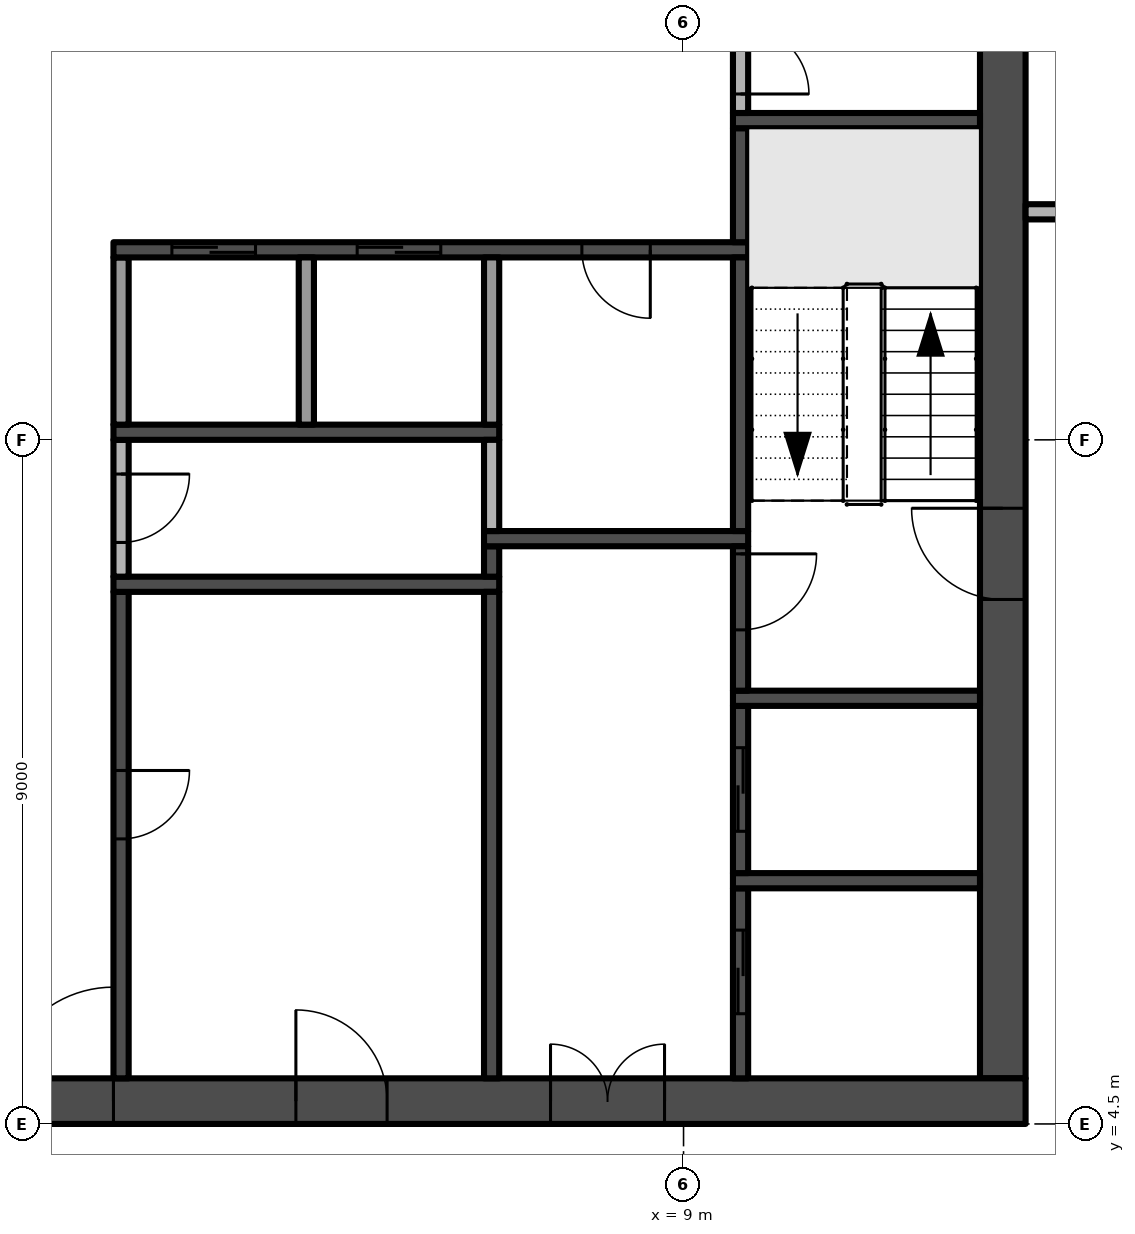
"""IFC4 building model, lengths in metres.
Left out: names, types, materials, properties, quantities, classifications, styles, units other than length and angle.
Written with IfcOpenShell. Run it as: python <this file> out.ifc"""

import sys

from ifc_helpers import new_model, si_unit, direction, frame, frame_2d, origin, place, context, subcontext, project, spatial, rectangle, extrude, element, fill, save


model = new_model("IFC4")
c1 = context("Model", 3, precision=1e-05, world=origin(), true_north=direction((0.0, 1.0)))
c2 = subcontext(c1, "Body", "Model", "MODEL_VIEW")
j1 = project(units=[si_unit("LENGTHUNIT", "METRE"), si_unit("PLANEANGLEUNIT", "RADIAN")], contexts=[c1])
p1 = place(None, origin())
s1 = spatial("IfcSite", under=j1, at=p1, CompositionType="ELEMENT")
p2 = place(p1, origin())
s2 = spatial("IfcBuilding", under=s1, at=p2, CompositionType="ELEMENT")
p3 = place(p2, frame((0.0, 0.0, 199.6)))
s3 = spatial("IfcBuildingStorey", under=s2, at=p3, CompositionType="ELEMENT", Elevation=199.6)
p4 = place(p3, frame((-13.5, 4.8, -0.3), z_axis=(0.0, 0.0, 1.0), x_axis=(1.0, 0.0, 0.0)))
e1 = element("IfcWall", 1, at=p4, inside=s3, PredefinedType="SHEAR", context=c2, shape_type="SweptSolid", body=[
    extrude(rectangle(XDim=27.0, YDim=0.6, at=frame_2d((13.5, 0.0))), origin(), (0.0, 0.0, 1.0), 3.8),
])
p5 = place(p4, frame((12.0, 0.0, 0.3)))
e2 = element("IfcOpeningElement", 2, at=p5, cuts=e1, PredefinedType="OPENING", context=c2, shape_type="SweptSolid", body=[
    extrude(rectangle(XDim=3.0, YDim=2.4, at=frame_2d((1.5, 1.2))), frame((0.0, 0.31, 0.0), z_axis=(0.0, -1.0, 0.0), x_axis=(1.0, 0.0, 0.0)), (0.0, 0.0, 1.0), 0.62),
])
p6 = place(p4, frame((4.9, 0.0, 0.3)))
e3 = element("IfcOpeningElement", 3, at=p6, cuts=e1, PredefinedType="OPENING", context=c2, shape_type="SweptSolid", body=[
    extrude(rectangle(XDim=1.2, YDim=2.2, at=frame_2d((0.6, 1.1))), frame((0.0, 0.31, 0.0), z_axis=(0.0, -1.0, 0.0), x_axis=(1.0, 0.0, 0.0)), (0.0, 0.0, 1.0), 0.62),
])
p7 = place(p4, frame((20.75, 0.0, 0.3)))
e4 = element("IfcOpeningElement", 4, at=p7, cuts=e1, PredefinedType="OPENING", context=c2, shape_type="SweptSolid", body=[
    extrude(rectangle(XDim=1.5, YDim=2.2, at=frame_2d((0.75, 1.1))), frame((0.0, 0.31, 0.0), z_axis=(0.0, -1.0, 0.0), x_axis=(1.0, 0.0, 0.0)), (0.0, 0.0, 1.0), 0.62),
])
p8 = place(p4, frame((17.4, 0.0, 0.3)))
e5 = element("IfcOpeningElement", 5, at=p8, cuts=e1, PredefinedType="OPENING", context=c2, shape_type="SweptSolid", body=[
    extrude(rectangle(XDim=1.2, YDim=2.2, at=frame_2d((0.6, 1.1))), frame((0.0, 0.31, 0.0), z_axis=(0.0, -1.0, 0.0), x_axis=(1.0, 0.0, 0.0)), (0.0, 0.0, 1.0), 0.62),
])
p9 = place(p3, frame((13.2, 5.1, -0.3), z_axis=(0.0, 0.0, 1.0), x_axis=(0.0, 1.0, 0.0)))
e6 = element("IfcWall", 6, at=p9, inside=s3, PredefinedType="SHEAR", context=c2, shape_type="SweptSolid", body=[
    extrude(rectangle(XDim=16.8, YDim=0.6, at=frame_2d((8.4, 0.0))), origin(), (0.0, 0.0, 1.0), 3.8),
])
p10 = place(p9, frame((6.3, 0.0, 0.3)))
e7 = element("IfcOpeningElement", 7, at=p10, cuts=e6, PredefinedType="OPENING", context=c2, shape_type="SweptSolid", body=[
    extrude(rectangle(XDim=1.2, YDim=2.2, at=frame_2d((0.6, 1.1))), frame((0.0, 0.31, 0.0), z_axis=(0.0, -1.0, 0.0), x_axis=(1.0, 0.0, 0.0)), (0.0, 0.0, 1.0), 0.62),
])
p11 = place(p3, frame((1.6, 11.5, 0.0), z_axis=(0.0, 0.0, 1.0), x_axis=(0.0, -1.0, 0.0)))
e8 = element("IfcWall", 8, at=p11, inside=s3, PredefinedType="SHEAR", context=c2, shape_type="SweptSolid", body=[
    extrude(rectangle(XDim=6.4, YDim=0.2, at=frame_2d((3.2, 0.0))), origin(), (0.0, 0.0, 1.0), 3.5),
])
p12 = place(p11, frame((2.35, 0.0, 0.0)))
e9 = element("IfcOpeningElement", 9, at=p12, cuts=e8, PredefinedType="OPENING", context=c2, shape_type="SweptSolid", body=[
    extrude(rectangle(XDim=0.9, YDim=2.1, at=frame_2d((0.45, 1.05))), frame((0.0, 0.11, 0.0), z_axis=(0.0, -1.0, 0.0), x_axis=(1.0, 0.0, 0.0)), (0.0, 0.0, 1.0), 0.22),
])
p13 = place(p3, frame((1.5, 11.6, 0.0), z_axis=(0.0, 0.0, 1.0), x_axis=(1.0, 0.0, 0.0)))
e10 = element("IfcWall", 10, at=p13, inside=s3, PredefinedType="SHEAR", context=c2, shape_type="SweptSolid", body=[
    extrude(rectangle(XDim=5.075, YDim=0.2, at=frame_2d((2.538, 0.0))), origin(), (0.0, 0.0, 1.0), 3.5),
])
p14 = place(p3, frame((1.6, 13.5, 0.0), z_axis=(0.0, 0.0, 1.0), x_axis=(0.0, -1.0, 0.0)))
e11 = element("IfcWall", 11, at=p14, inside=s3, PredefinedType="PARTITIONING", context=c2, shape_type="SweptSolid", body=[
    extrude(rectangle(XDim=1.8, YDim=0.2, at=frame_2d((0.9, 0.0))), origin(), (0.0, 0.0, 1.0), 3.5),
])
p15 = place(p14, frame((0.45, 0.0, 0.0)))
e12 = element("IfcOpeningElement", 12, at=p15, cuts=e11, PredefinedType="OPENING", context=c2, shape_type="SweptSolid", body=[
    extrude(rectangle(XDim=0.9, YDim=2.1, at=frame_2d((0.45, 1.05))), frame((0.0, 0.11, 0.0), z_axis=(0.0, -1.0, 0.0), x_axis=(1.0, 0.0, 0.0)), (0.0, 0.0, 1.0), 0.22),
])
p16 = place(p3, frame((1.5, 13.6, 0.0), z_axis=(0.0, 0.0, 1.0), x_axis=(1.0, 0.0, 0.0)))
e13 = element("IfcWall", 13, at=p16, inside=s3, PredefinedType="SHEAR", context=c2, shape_type="SweptSolid", body=[
    extrude(rectangle(XDim=5.075, YDim=0.2, at=frame_2d((2.538, 0.0))), origin(), (0.0, 0.0, 1.0), 3.5),
])
p17 = place(p3, frame((1.6, 13.7, 0.0), z_axis=(0.0, 0.0, 1.0), x_axis=(0.0, 1.0, 0.0)))
e14 = element("IfcWall", 14, at=p17, inside=s3, PredefinedType="PARTITIONING", context=c2, shape_type="SweptSolid", body=[
    extrude(rectangle(XDim=2.2, YDim=0.2, at=frame_2d((1.1, 0.0))), origin(), (0.0, 0.0, 1.0), 3.5),
])
p18 = place(p3, frame((9.85, 16.0, 0.0), z_axis=(0.0, 0.0, 1.0), x_axis=(-1.0, 0.0, 0.0)))
e15 = element("IfcWall", 15, at=p18, inside=s3, PredefinedType="SHEAR", context=c2, shape_type="SweptSolid", body=[
    extrude(rectangle(XDim=8.35, YDim=0.2, at=frame_2d((4.175, 0.0))), origin(), (0.0, 0.0, 1.0), 3.5),
])
p19 = place(p18, frame((6.481, 0.0, 0.0)))
e16 = element("IfcOpeningElement", 16, at=p19, cuts=e15, PredefinedType="OPENING", context=c2, shape_type="SweptSolid", body=[
    extrude(rectangle(XDim=1.1, YDim=2.1, at=frame_2d((0.55, 1.05))), frame((0.0, 0.11, 0.0), z_axis=(0.0, -1.0, 0.0), x_axis=(1.0, 0.0, 0.0)), (0.0, 0.0, 1.0), 0.22),
])
p20 = place(p18, frame((4.044, 0.0, 0.0)))
e17 = element("IfcOpeningElement", 17, at=p20, cuts=e15, PredefinedType="OPENING", context=c2, shape_type="SweptSolid", body=[
    extrude(rectangle(XDim=1.1, YDim=2.1, at=frame_2d((0.55, 1.05))), frame((0.0, 0.11, 0.0), z_axis=(0.0, -1.0, 0.0), x_axis=(1.0, 0.0, 0.0)), (0.0, 0.0, 1.0), 0.22),
])
p21 = place(p18, frame((1.288, 0.0, 0.0)))
e18 = element("IfcOpeningElement", 18, at=p21, cuts=e15, PredefinedType="OPENING", context=c2, shape_type="SweptSolid", body=[
    extrude(rectangle(XDim=0.9, YDim=2.1, at=frame_2d((0.45, 1.05))), frame((0.0, 0.11, 0.0), z_axis=(0.0, -1.0, 0.0), x_axis=(1.0, 0.0, 0.0)), (0.0, 0.0, 1.0), 0.22),
])
p22 = place(p3, frame((4.037, 13.7, 0.0), z_axis=(0.0, 0.0, 1.0), x_axis=(0.0, 1.0, 0.0)))
e19 = element("IfcWall", 19, at=p22, inside=s3, PredefinedType="PARTITIONING", context=c2, shape_type="SweptSolid", body=[
    extrude(rectangle(XDim=2.2, YDim=0.2, at=frame_2d((1.1, 0.0))), origin(), (0.0, 0.0, 1.0), 3.5),
])
p23 = place(p3, frame((6.475, 5.1, 0.0), z_axis=(0.0, 0.0, 1.0), x_axis=(0.0, 1.0, 0.0)))
e20 = element("IfcWall", 20, at=p23, inside=s3, PredefinedType="SHEAR", context=c2, shape_type="SweptSolid", body=[
    extrude(rectangle(XDim=6.4, YDim=0.2, at=frame_2d((3.2, 0.0))), origin(), (0.0, 0.0, 1.0), 3.5),
])
p24 = place(p3, frame((6.475, 11.7, 0.0), z_axis=(0.0, 0.0, 1.0), x_axis=(0.0, 1.0, 0.0)))
e21 = element("IfcWall", 21, at=p24, inside=s3, PredefinedType="SHEAR", context=c2, shape_type="SweptSolid", body=[
    extrude(rectangle(XDim=0.4, YDim=0.2, at=frame_2d((0.2, 0.0))), origin(), (0.0, 0.0, 1.0), 3.5),
])
p25 = place(p3, frame((6.375, 12.2, 0.0), z_axis=(0.0, 0.0, 1.0), x_axis=(1.0, 0.0, 0.0)))
e22 = element("IfcWall", 22, at=p25, inside=s3, PredefinedType="SHEAR", context=c2, shape_type="SweptSolid", body=[
    extrude(rectangle(XDim=3.475, YDim=0.2, at=frame_2d((1.738, 0.0))), origin(), (0.0, 0.0, 1.0), 3.5),
])
p26 = place(p3, frame((6.475, 12.3, 0.0), z_axis=(0.0, 0.0, 1.0), x_axis=(0.0, 1.0, 0.0)))
e23 = element("IfcWall", 23, at=p26, inside=s3, PredefinedType="PARTITIONING", context=c2, shape_type="SweptSolid", body=[
    extrude(rectangle(XDim=1.2, YDim=0.2, at=frame_2d((0.6, 0.0))), origin(), (0.0, 0.0, 1.0), 3.5),
])
p27 = place(p3, frame((6.475, 13.7, 0.0), z_axis=(0.0, 0.0, 1.0), x_axis=(0.0, 1.0, 0.0)))
e24 = element("IfcWall", 24, at=p27, inside=s3, PredefinedType="PARTITIONING", context=c2, shape_type="SweptSolid", body=[
    extrude(rectangle(XDim=2.2, YDim=0.2, at=frame_2d((1.1, 0.0))), origin(), (0.0, 0.0, 1.0), 3.5),
])
p28 = place(p3, frame((9.75, 5.1, 0.0), z_axis=(0.0, 0.0, 1.0), x_axis=(0.0, 1.0, 0.0)))
e25 = element("IfcWall", 25, at=p28, inside=s3, PredefinedType="SHEAR", context=c2, shape_type="SweptSolid", body=[
    extrude(rectangle(XDim=2.5, YDim=0.2, at=frame_2d((1.25, 0.0))), origin(), (0.0, 0.0, 1.0), 3.5),
])
p29 = place(p28, frame((0.85, 0.0, 0.0)))
e26 = element("IfcOpeningElement", 26, at=p29, cuts=e25, PredefinedType="OPENING", context=c2, shape_type="SweptSolid", body=[
    extrude(rectangle(XDim=1.1, YDim=2.1, at=frame_2d((0.55, 1.05))), frame((0.0, 0.11, 0.0), z_axis=(0.0, -1.0, 0.0), x_axis=(1.0, 0.0, 0.0)), (0.0, 0.0, 1.0), 0.22),
])
p30 = place(p3, frame((9.65, 7.7, 0.0), z_axis=(0.0, 0.0, 1.0), x_axis=(1.0, 0.0, 0.0)))
e27 = element("IfcWall", 27, at=p30, inside=s3, PredefinedType="SHEAR", context=c2, shape_type="SweptSolid", body=[
    extrude(rectangle(XDim=3.25, YDim=0.2, at=frame_2d((1.625, 0.0))), origin(), (0.0, 0.0, 1.0), 3.5),
])
p31 = place(p3, frame((9.75, 7.8, 0.0), z_axis=(0.0, 0.0, 1.0), x_axis=(0.0, 1.0, 0.0)))
e28 = element("IfcWall", 28, at=p31, inside=s3, PredefinedType="SHEAR", context=c2, shape_type="SweptSolid", body=[
    extrude(rectangle(XDim=2.2, YDim=0.2, at=frame_2d((1.1, 0.0))), origin(), (0.0, 0.0, 1.0), 3.5),
])
p32 = place(p31, frame((0.55, 0.0, 0.0)))
e29 = element("IfcOpeningElement", 29, at=p32, cuts=e28, PredefinedType="OPENING", context=c2, shape_type="SweptSolid", body=[
    extrude(rectangle(XDim=1.1, YDim=2.1, at=frame_2d((0.55, 1.05))), frame((0.0, 0.11, 0.0), z_axis=(0.0, -1.0, 0.0), x_axis=(1.0, 0.0, 0.0)), (0.0, 0.0, 1.0), 0.22),
])
p33 = place(p3, frame((9.65, 10.1, 0.0), z_axis=(0.0, 0.0, 1.0), x_axis=(1.0, 0.0, 0.0)))
e30 = element("IfcWall", 30, at=p33, inside=s3, PredefinedType="SHEAR", context=c2, shape_type="SweptSolid", body=[
    extrude(rectangle(XDim=3.25, YDim=0.2, at=frame_2d((1.625, 0.0))), origin(), (0.0, 0.0, 1.0), 3.5),
])
p34 = place(p3, frame((9.75, 12.1, 0.0), z_axis=(0.0, 0.0, 1.0), x_axis=(0.0, -1.0, 0.0)))
e31 = element("IfcWall", 31, at=p34, inside=s3, PredefinedType="SHEAR", context=c2, shape_type="SweptSolid", body=[
    extrude(rectangle(XDim=1.9, YDim=0.2, at=frame_2d((0.95, 0.0))), origin(), (0.0, 0.0, 1.0), 3.5),
])
p35 = place(p34, frame((0.1, 0.0, 0.0)))
e32 = element("IfcOpeningElement", 32, at=p35, cuts=e31, PredefinedType="OPENING", context=c2, shape_type="SweptSolid", body=[
    extrude(rectangle(XDim=1.0, YDim=2.2, at=frame_2d((0.5, 1.1))), frame((0.0, 0.11, 0.0), z_axis=(0.0, -1.0, 0.0), x_axis=(1.0, 0.0, 0.0)), (0.0, 0.0, 1.0), 0.22),
])
p36 = place(p3, frame((9.75, 12.3, 0.0), z_axis=(0.0, 0.0, 1.0), x_axis=(0.0, 1.0, 0.0)))
e33 = element("IfcWall", 33, at=p36, inside=s3, PredefinedType="SHEAR", context=c2, shape_type="SweptSolid", body=[
    extrude(rectangle(XDim=3.6, YDim=0.2, at=frame_2d((1.8, 0.0))), origin(), (0.0, 0.0, 1.0), 3.5),
])
p37 = place(p3, frame((9.75, 16.1, 0.0), z_axis=(0.0, 0.0, 1.0), x_axis=(0.0, 1.0, 0.0)))
e34 = element("IfcWall", 34, at=p37, inside=s3, PredefinedType="SHEAR", context=c2, shape_type="SweptSolid", body=[
    extrude(rectangle(XDim=1.5, YDim=0.2, at=frame_2d((0.75, 0.0))), origin(), (0.0, 0.0, 1.0), 3.5),
])
p38 = place(p3, frame((9.65, 17.7, 0.0), z_axis=(0.0, 0.0, 1.0), x_axis=(1.0, 0.0, 0.0)))
e35 = element("IfcWall", 35, at=p38, inside=s3, PredefinedType="SHEAR", context=c2, shape_type="SweptSolid", body=[
    extrude(rectangle(XDim=3.25, YDim=0.2, at=frame_2d((1.625, 0.0))), origin(), (0.0, 0.0, 1.0), 3.5),
])
p39 = place(p3, frame((9.75, 19.2, 0.0), z_axis=(0.0, 0.0, 1.0), x_axis=(0.0, -1.0, 0.0)))
e36 = element("IfcWall", 36, at=p39, inside=s3, PredefinedType="PARTITIONING", context=c2, shape_type="SweptSolid", body=[
    extrude(rectangle(XDim=1.4, YDim=0.2, at=frame_2d((0.7, 0.0))), origin(), (0.0, 0.0, 1.0), 3.5),
])
p40 = place(p39, frame((0.25, 0.0, 0.0)))
e37 = element("IfcOpeningElement", 37, at=p40, cuts=e36, PredefinedType="OPENING", context=c2, shape_type="SweptSolid", body=[
    extrude(rectangle(XDim=0.9, YDim=2.1, at=frame_2d((0.45, 1.05))), frame((0.0, 0.11, 0.0), z_axis=(0.0, -1.0, 0.0), x_axis=(1.0, 0.0, 0.0)), (0.0, 0.0, 1.0), 0.22),
])
p41 = place(p3, frame((13.5, 16.5, 0.0), z_axis=(0.0, 0.0, 1.0), x_axis=(1.0, 0.0, 0.0)))
e38 = element("IfcWall", 38, at=p41, inside=s3, PredefinedType="PARTITIONING", context=c2, shape_type="SweptSolid", body=[
    extrude(rectangle(XDim=3.825, YDim=0.2, at=frame_2d((1.913, 0.0))), origin(), (0.0, 0.0, 1.0), 3.5),
])
p42 = place(p41, frame((1.55, 0.0, 0.0)))
e39 = element("IfcOpeningElement", 39, at=p42, cuts=e38, PredefinedType="OPENING", context=c2, shape_type="SweptSolid", body=[
    extrude(rectangle(XDim=0.9, YDim=2.1, at=frame_2d((0.45, 1.05))), frame((0.0, 0.11, 0.0), z_axis=(0.0, -1.0, 0.0), x_axis=(1.0, 0.0, 0.0)), (0.0, 0.0, 1.0), 0.22),
])
p43 = place(p5, frame((3.0, 0.0, 0.0), z_axis=(0.0, 0.0, 1.0), x_axis=(-1.0, 0.0, 0.0)))
e40 = element("IfcDoor", 40, at=p43, inside=s3, OperationType="DOUBLE_DOOR_SINGLE_SWING", PredefinedType="DOOR", context=c2, shape_type="SweptSolid", body=[
    extrude(rectangle(XDim=3.0, YDim=2.4, at=frame_2d((1.5, 1.2))), frame((0.0, 0.025, 0.0), z_axis=(0.0, -1.0, 0.0), x_axis=(1.0, 0.0, 0.0)), (0.0, 0.0, 1.0), 0.05),
])
fill(e2, e40)
p44 = place(p10, frame((1.2, 0.0, 0.0), z_axis=(0.0, 0.0, 1.0), x_axis=(-1.0, 0.0, 0.0)))
e41 = element("IfcDoor", 41, at=p44, inside=s3, OperationType="SINGLE_SWING_LEFT", PredefinedType="DOOR", context=c2, shape_type="SweptSolid", body=[
    extrude(rectangle(XDim=1.2, YDim=2.2, at=frame_2d((0.6, 1.1))), frame((0.0, 0.025, 0.0), z_axis=(0.0, -1.0, 0.0), x_axis=(1.0, 0.0, 0.0)), (0.0, 0.0, 1.0), 0.05),
])
fill(e7, e41)
p45 = place(p7, frame((1.5, 0.0, 0.0), z_axis=(0.0, 0.0, 1.0), x_axis=(-1.0, 0.0, 0.0)))
e42 = element("IfcDoor", 42, at=p45, inside=s3, OperationType="DOUBLE_DOOR_SINGLE_SWING", PredefinedType="DOOR", context=c2, shape_type="SweptSolid", body=[
    extrude(rectangle(XDim=1.5, YDim=2.2, at=frame_2d((0.75, 1.1))), frame((0.0, 0.025, 0.0), z_axis=(0.0, -1.0, 0.0), x_axis=(1.0, 0.0, 0.0)), (0.0, 0.0, 1.0), 0.05),
])
fill(e4, e42)
p46 = place(p8, frame((1.2, 0.0, 0.0), z_axis=(0.0, 0.0, 1.0), x_axis=(-1.0, 0.0, 0.0)))
e43 = element("IfcDoor", 43, at=p46, inside=s3, OperationType="SINGLE_SWING_RIGHT", PredefinedType="DOOR", context=c2, shape_type="SweptSolid", body=[
    extrude(rectangle(XDim=1.2, YDim=2.2, at=frame_2d((0.6, 1.1))), frame((0.0, 0.025, 0.0), z_axis=(0.0, -1.0, 0.0), x_axis=(1.0, 0.0, 0.0)), (0.0, 0.0, 1.0), 0.05),
])
fill(e5, e43)
p47 = place(p35, origin())
e44 = element("IfcDoor", 44, at=p47, inside=s3, OperationType="SINGLE_SWING_LEFT", PredefinedType="DOOR", context=c2, shape_type="SweptSolid", body=[
    extrude(rectangle(XDim=1.0, YDim=2.2, at=frame_2d((0.5, 1.1))), frame((0.0, 0.025, 0.0), z_axis=(0.0, -1.0, 0.0), x_axis=(1.0, 0.0, 0.0)), (0.0, 0.0, 1.0), 0.05),
])
fill(e32, e44)
p48 = place(p19, origin())
e45 = element("IfcDoor", 45, at=p48, inside=s3, OperationType="SLIDING_TO_RIGHT", PredefinedType="DOOR", context=c2, shape_type="SweptSolid", body=[
    extrude(rectangle(XDim=1.1, YDim=2.1, at=frame_2d((0.55, 1.05))), frame((0.0, 0.025, 0.0), z_axis=(0.0, -1.0, 0.0), x_axis=(1.0, 0.0, 0.0)), (0.0, 0.0, 1.0), 0.05),
])
fill(e16, e45)
p49 = place(p20, origin())
e46 = element("IfcDoor", 46, at=p49, inside=s3, OperationType="SLIDING_TO_RIGHT", PredefinedType="DOOR", context=c2, shape_type="SweptSolid", body=[
    extrude(rectangle(XDim=1.1, YDim=2.1, at=frame_2d((0.55, 1.05))), frame((0.0, 0.025, 0.0), z_axis=(0.0, -1.0, 0.0), x_axis=(1.0, 0.0, 0.0)), (0.0, 0.0, 1.0), 0.05),
])
fill(e17, e46)
p50 = place(p29, origin())
e47 = element("IfcDoor", 47, at=p50, inside=s3, OperationType="SLIDING_TO_RIGHT", PredefinedType="DOOR", context=c2, shape_type="SweptSolid", body=[
    extrude(rectangle(XDim=1.1, YDim=2.1, at=frame_2d((0.55, 1.05))), frame((0.0, 0.025, 0.0), z_axis=(0.0, -1.0, 0.0), x_axis=(1.0, 0.0, 0.0)), (0.0, 0.0, 1.0), 0.05),
])
fill(e26, e47)
p51 = place(p32, origin())
e48 = element("IfcDoor", 48, at=p51, inside=s3, OperationType="SLIDING_TO_RIGHT", PredefinedType="DOOR", context=c2, shape_type="SweptSolid", body=[
    extrude(rectangle(XDim=1.1, YDim=2.1, at=frame_2d((0.55, 1.05))), frame((0.0, 0.025, 0.0), z_axis=(0.0, -1.0, 0.0), x_axis=(1.0, 0.0, 0.0)), (0.0, 0.0, 1.0), 0.05),
])
fill(e29, e48)
p52 = place(p12, origin())
e49 = element("IfcDoor", 49, at=p52, inside=s3, OperationType="SINGLE_SWING_LEFT", PredefinedType="DOOR", context=c2, shape_type="SweptSolid", body=[
    extrude(rectangle(XDim=0.9, YDim=2.1, at=frame_2d((0.45, 1.05))), frame((0.0, 0.025, 0.0), z_axis=(0.0, -1.0, 0.0), x_axis=(1.0, 0.0, 0.0)), (0.0, 0.0, 1.0), 0.05),
])
fill(e9, e49)
p53 = place(p15, origin())
e50 = element("IfcDoor", 50, at=p53, inside=s3, OperationType="SINGLE_SWING_LEFT", PredefinedType="DOOR", context=c2, shape_type="SweptSolid", body=[
    extrude(rectangle(XDim=0.9, YDim=2.1, at=frame_2d((0.45, 1.05))), frame((0.0, 0.025, 0.0), z_axis=(0.0, -1.0, 0.0), x_axis=(1.0, 0.0, 0.0)), (0.0, 0.0, 1.0), 0.05),
])
fill(e12, e50)
p54 = place(p21, origin())
e51 = element("IfcDoor", 51, at=p54, inside=s3, OperationType="SINGLE_SWING_LEFT", PredefinedType="DOOR", context=c2, shape_type="SweptSolid", body=[
    extrude(rectangle(XDim=0.9, YDim=2.1, at=frame_2d((0.45, 1.05))), frame((0.0, 0.025, 0.0), z_axis=(0.0, -1.0, 0.0), x_axis=(1.0, 0.0, 0.0)), (0.0, 0.0, 1.0), 0.05),
])
fill(e18, e51)
p55 = place(p40, origin())
e52 = element("IfcDoor", 52, at=p55, inside=s3, OperationType="SINGLE_SWING_RIGHT", PredefinedType="DOOR", context=c2, shape_type="SweptSolid", body=[
    extrude(rectangle(XDim=0.9, YDim=2.1, at=frame_2d((0.45, 1.05))), frame((0.0, 0.025, 0.0), z_axis=(0.0, -1.0, 0.0), x_axis=(1.0, 0.0, 0.0)), (0.0, 0.0, 1.0), 0.05),
])
fill(e37, e52)
save(model, sys.argv[1])
